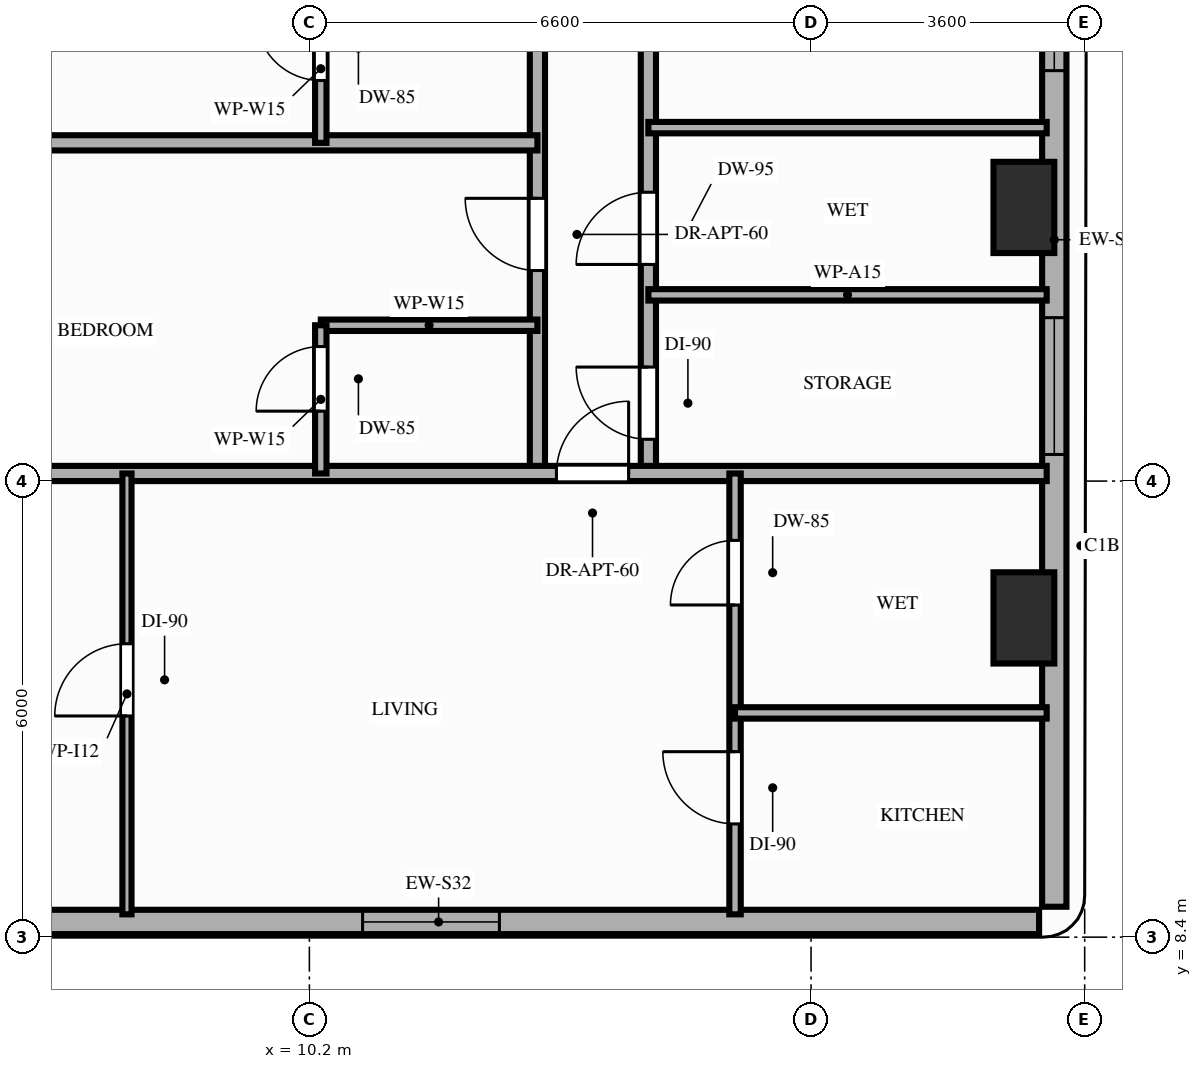
"""IFC4 building model, lengths in metres.
Left out: names, types, materials, properties, quantities, classifications, styles, units other than length and angle.
Written with IfcOpenShell. Run it as: python <this file> out.ifc"""

import sys

from ifc_helpers import new_model, si_unit, direction, frame, frame_2d, origin, origin_2d, place, context, subcontext, project, spatial, rectangle, extrude, element, fill, save


model = new_model("IFC4")
c1 = context("Model", 3, precision=1e-05, world=origin(), true_north=direction((0.0, 1.0)))
c2 = subcontext(c1, "Body", "Model", "MODEL_VIEW")
j1 = project(units=[si_unit("LENGTHUNIT", "METRE"), si_unit("PLANEANGLEUNIT", "RADIAN")], contexts=[c1])
p1 = place(None, origin())
s1 = spatial("IfcSite", under=j1, at=p1, CompositionType="ELEMENT")
p2 = place(p1, origin())
s2 = spatial("IfcBuilding", under=s1, at=p2, CompositionType="ELEMENT")
p3 = place(p2, frame((0.0, 0.0, 83.4)))
s3 = spatial("IfcBuildingStorey", under=s2, at=p3, CompositionType="ELEMENT", Elevation=83.4)
for number, where, z_axis, x_axis in (
    (1, (19.6, 12.6, 0.0), (0.0, 0.0, 1.0), (1.0, 0.0, 0.0)),
    (2, (19.6, 18.0, 0.0), (0.0, 0.0, 1.0), (1.0, 0.0, 0.0)),
):
    element("IfcColumn", number, at=place(p3, frame(where, z_axis=z_axis, x_axis=x_axis)), inside=s3, PredefinedType="COLUMN", context=c2, shape_type="SweptSolid", body=[
        extrude(rectangle(XDim=0.8, YDim=1.2, at=origin_2d()), origin(), (0.0, 0.0, 1.0), 3.2),
    ])
p4 = place(p3, frame((4.0, 8.6, 0.0), z_axis=(0.0, 0.0, 1.0), x_axis=(1.0, 0.0, 0.0)))
e3 = element("IfcWall", 3, at=p4, inside=s3, PredefinedType="STANDARD", context=c2, shape_type="SweptSolid", body=[
    extrude(rectangle(XDim=15.8, YDim=0.32, at=frame_2d((7.9, 0.0))), origin(), (0.0, 0.0, 1.0), 3.02),
])
p5 = place(p4, frame((6.9, 0.0, 0.85)))
e4 = element("IfcOpeningElement", 4, at=p5, cuts=e3, PredefinedType="OPENING", context=c2, shape_type="SweptSolid", body=[
    extrude(rectangle(XDim=1.8, YDim=1.75, at=frame_2d((0.9, 0.875))), frame((0.0, 0.17, 0.0), z_axis=(0.0, -1.0, 0.0), x_axis=(1.0, 0.0, 0.0)), (0.0, 0.0, 1.0), 0.34),
])
p6 = place(p3, frame((20.0, 8.8, 0.0), z_axis=(0.0, 0.0, 1.0), x_axis=(0.0, 1.0, 0.0)))
e5 = element("IfcWall", 5, at=p6, inside=s3, PredefinedType="STANDARD", context=c2, shape_type="SweptSolid", body=[
    extrude(rectangle(XDim=17.55, YDim=0.32, at=frame_2d((8.775, 0.0))), origin(), (0.0, 0.0, 1.0), 2.41),
])
p7 = place(p6, frame((5.95, 0.0, 0.85)))
e6 = element("IfcOpeningElement", 6, at=p7, cuts=e5, PredefinedType="OPENING", context=c2, shape_type="SweptSolid", body=[
    extrude(rectangle(XDim=1.8, YDim=1.31, at=frame_2d((0.9, 0.655))), frame((0.0, 0.17, 0.0), z_axis=(0.0, -1.0, 0.0), x_axis=(1.0, 0.0, 0.0)), (0.0, 0.0, 1.0), 0.34),
])
p8 = place(p6, frame((11.0, 0.0, 0.85)))
e7 = element("IfcOpeningElement", 7, at=p8, cuts=e5, PredefinedType="OPENING", context=c2, shape_type="SweptSolid", body=[
    extrude(rectangle(XDim=1.8, YDim=1.31, at=frame_2d((0.9, 0.655))), frame((0.0, 0.17, 0.0), z_axis=(0.0, -1.0, 0.0), x_axis=(1.0, 0.0, 0.0)), (0.0, 0.0, 1.0), 0.34),
])
p9 = place(p3, frame((13.2, 14.5, 0.0), z_axis=(0.0, 0.0, 1.0), x_axis=(0.0, 1.0, 0.0)))
e8 = element("IfcWall", 8, at=p9, inside=s3, PredefinedType="PARTITIONING", context=c2, shape_type="SweptSolid", body=[
    extrude(rectangle(XDim=13.6, YDim=0.2, at=frame_2d((6.8, 0.0))), origin(), (0.0, 0.0, 1.0), 2.41),
])
p10 = place(p9, frame((2.67, 0.0, 0.0)))
e9 = element("IfcOpeningElement", 9, at=p10, cuts=e8, PredefinedType="OPENING", context=c2, shape_type="SweptSolid", body=[
    extrude(rectangle(XDim=0.95, YDim=2.15, at=frame_2d((0.475, 1.075))), frame((0.0, 0.11, 0.0), z_axis=(0.0, -1.0, 0.0), x_axis=(1.0, 0.0, 0.0)), (0.0, 0.0, 1.0), 0.22),
])
p11 = place(p9, frame((8.46, 0.0, 0.0)))
e10 = element("IfcOpeningElement", 10, at=p11, cuts=e8, PredefinedType="OPENING", context=c2, shape_type="SweptSolid", body=[
    extrude(rectangle(XDim=0.95, YDim=2.15, at=frame_2d((0.475, 1.075))), frame((0.0, 0.11, 0.0), z_axis=(0.0, -1.0, 0.0), x_axis=(1.0, 0.0, 0.0)), (0.0, 0.0, 1.0), 0.22),
])
p12 = place(p9, frame((6.64, 0.0, 0.0)))
e11 = element("IfcOpeningElement", 11, at=p12, cuts=e8, PredefinedType="OPENING", context=c2, shape_type="SweptSolid", body=[
    extrude(rectangle(XDim=0.95, YDim=2.15, at=frame_2d((0.475, 1.075))), frame((0.0, 0.11, 0.0), z_axis=(0.0, -1.0, 0.0), x_axis=(1.0, 0.0, 0.0)), (0.0, 0.0, 1.0), 0.22),
])
p13 = place(p9, frame((12.26, 0.0, 0.0)))
e12 = element("IfcOpeningElement", 12, at=p13, cuts=e8, PredefinedType="OPENING", context=c2, shape_type="SweptSolid", body=[
    extrude(rectangle(XDim=0.95, YDim=2.15, at=frame_2d((0.475, 1.075))), frame((0.0, 0.11, 0.0), z_axis=(0.0, -1.0, 0.0), x_axis=(1.0, 0.0, 0.0)), (0.0, 0.0, 1.0), 0.22),
])
p14 = place(p3, frame((14.66, 14.5, 0.0), z_axis=(0.0, 0.0, 1.0), x_axis=(0.0, 1.0, 0.0)))
e13 = element("IfcWall", 13, at=p14, inside=s3, PredefinedType="PARTITIONING", context=c2, shape_type="SweptSolid", body=[
    extrude(rectangle(XDim=13.6, YDim=0.2, at=frame_2d((6.8, 0.0))), origin(), (0.0, 0.0, 1.0), 2.41),
])
p15 = place(p14, frame((0.45, 0.0, 0.0)))
e14 = element("IfcOpeningElement", 14, at=p15, cuts=e13, PredefinedType="OPENING", context=c2, shape_type="SweptSolid", body=[
    extrude(rectangle(XDim=0.95, YDim=2.15, at=frame_2d((0.475, 1.075))), frame((0.0, 0.11, 0.0), z_axis=(0.0, -1.0, 0.0), x_axis=(1.0, 0.0, 0.0)), (0.0, 0.0, 1.0), 0.22),
])
p16 = place(p14, frame((2.75, 0.0, 0.0)))
e15 = element("IfcOpeningElement", 15, at=p16, cuts=e13, PredefinedType="OPENING", context=c2, shape_type="SweptSolid", body=[
    extrude(rectangle(XDim=0.95, YDim=2.1, at=frame_2d((0.475, 1.05))), frame((0.0, 0.11, 0.0), z_axis=(0.0, -1.0, 0.0), x_axis=(1.0, 0.0, 0.0)), (0.0, 0.0, 1.0), 0.22),
])
p17 = place(p14, frame((8.58, 0.0, 0.0)))
e16 = element("IfcOpeningElement", 16, at=p17, cuts=e13, PredefinedType="OPENING", context=c2, shape_type="SweptSolid", body=[
    extrude(rectangle(XDim=1.0, YDim=2.15, at=frame_2d((0.5, 1.075))), frame((0.0, 0.11, 0.0), z_axis=(0.0, -1.0, 0.0), x_axis=(1.0, 0.0, 0.0)), (0.0, 0.0, 1.0), 0.22),
])
p18 = place(p3, frame((3.9, 14.5, 0.0), z_axis=(0.0, 0.0, 1.0), x_axis=(1.0, 0.0, 0.0)))
e17 = element("IfcWall", 17, at=p18, inside=s3, PredefinedType="PARTITIONING", context=c2, shape_type="SweptSolid", body=[
    extrude(rectangle(XDim=16.0, YDim=0.2, at=frame_2d((8.0, 0.0))), origin(), (0.0, 0.0, 1.0), 2.41),
])
p19 = place(p18, frame((9.55, 0.0, 0.0)))
e18 = element("IfcOpeningElement", 18, at=p19, cuts=e17, PredefinedType="OPENING", context=c2, shape_type="SweptSolid", body=[
    extrude(rectangle(XDim=0.95, YDim=2.15, at=frame_2d((0.475, 1.075))), frame((0.0, 0.11, 0.0), z_axis=(0.0, -1.0, 0.0), x_axis=(1.0, 0.0, 0.0)), (0.0, 0.0, 1.0), 0.22),
])
p20 = place(p3, frame((10.35, 16.45, 0.0), z_axis=(0.0, 0.0, 1.0), x_axis=(1.0, 0.0, 0.0)))
e19 = element("IfcWall", 19, at=p20, inside=s3, PredefinedType="PARTITIONING", context=c2, shape_type="SweptSolid", body=[
    extrude(rectangle(XDim=2.85, YDim=0.15, at=frame_2d((1.425, 0.0))), origin(), (0.0, 0.0, 1.0), 2.6),
])
p21 = place(p3, frame((10.35, 14.5, 0.0), z_axis=(0.0, 0.0, 1.0), x_axis=(0.0, 1.0, 0.0)))
e20 = element("IfcWall", 20, at=p21, inside=s3, PredefinedType="PARTITIONING", context=c2, shape_type="SweptSolid", body=[
    extrude(rectangle(XDim=1.95, YDim=0.15, at=frame_2d((0.975, 0.0))), origin(), (0.0, 0.0, 1.0), 2.6),
])
p22 = place(p21, frame((0.82, 0.0, 0.0)))
e21 = element("IfcOpeningElement", 21, at=p22, cuts=e20, PredefinedType="OPENING", context=c2, shape_type="SweptSolid", body=[
    extrude(rectangle(XDim=0.85, YDim=2.1, at=frame_2d((0.425, 1.05))), frame((0.0, 0.085, 0.0), z_axis=(0.0, -1.0, 0.0), x_axis=(1.0, 0.0, 0.0)), (0.0, 0.0, 1.0), 0.17),
])
p23 = place(p3, frame((3.9, 18.85, 0.0), z_axis=(0.0, 0.0, 1.0), x_axis=(1.0, 0.0, 0.0)))
e22 = element("IfcWall", 22, at=p23, inside=s3, PredefinedType="PARTITIONING", context=c2, shape_type="SweptSolid", body=[
    extrude(rectangle(XDim=9.3, YDim=0.2, at=frame_2d((4.65, 0.0))), origin(), (0.0, 0.0, 1.0), 2.41),
])
p24 = place(p3, frame((10.35, 18.85, 0.0), z_axis=(0.0, 0.0, 1.0), x_axis=(0.0, 1.0, 0.0)))
e23 = element("IfcWall", 23, at=p24, inside=s3, PredefinedType="PARTITIONING", context=c2, shape_type="SweptSolid", body=[
    extrude(rectangle(XDim=1.95, YDim=0.15, at=frame_2d((0.975, 0.0))), origin(), (0.0, 0.0, 1.0), 2.71),
])
p25 = place(p24, frame((0.82, 0.0, 0.0)))
e24 = element("IfcOpeningElement", 24, at=p25, cuts=e23, PredefinedType="OPENING", context=c2, shape_type="SweptSolid", body=[
    extrude(rectangle(XDim=0.85, YDim=2.1, at=frame_2d((0.425, 1.05))), frame((0.0, 0.085, 0.0), z_axis=(0.0, -1.0, 0.0), x_axis=(1.0, 0.0, 0.0)), (0.0, 0.0, 1.0), 0.17),
])
p26 = place(p3, frame((7.8, 8.7, 0.0), z_axis=(0.0, 0.0, 1.0), x_axis=(0.0, 1.0, 0.0)))
e25 = element("IfcWall", 25, at=p26, inside=s3, PredefinedType="PARTITIONING", context=c2, shape_type="SweptSolid", body=[
    extrude(rectangle(XDim=5.8, YDim=0.12, at=frame_2d((2.9, 0.0))), origin(), (0.0, 0.0, 1.0), 2.41),
])
p27 = place(p26, frame((2.61, 0.0, 0.0)))
e26 = element("IfcOpeningElement", 26, at=p27, cuts=e25, PredefinedType="OPENING", context=c2, shape_type="SweptSolid", body=[
    extrude(rectangle(XDim=0.95, YDim=2.15, at=frame_2d((0.475, 1.075))), frame((0.0, 0.07, 0.0), z_axis=(0.0, -1.0, 0.0), x_axis=(1.0, 0.0, 0.0)), (0.0, 0.0, 1.0), 0.14),
])
p28 = place(p3, frame((15.8, 8.7, 0.0), z_axis=(0.0, 0.0, 1.0), x_axis=(0.0, 1.0, 0.0)))
e27 = element("IfcWall", 27, at=p28, inside=s3, PredefinedType="PARTITIONING", context=c2, shape_type="SweptSolid", body=[
    extrude(rectangle(XDim=5.8, YDim=0.15, at=frame_2d((2.9, 0.0))), origin(), (0.0, 0.0, 1.0), 2.41),
])
p29 = place(p28, frame((1.19, 0.0, 0.0)))
e28 = element("IfcOpeningElement", 28, at=p29, cuts=e27, PredefinedType="OPENING", context=c2, shape_type="SweptSolid", body=[
    extrude(rectangle(XDim=0.95, YDim=2.15, at=frame_2d((0.475, 1.075))), frame((0.0, 0.085, 0.0), z_axis=(0.0, -1.0, 0.0), x_axis=(1.0, 0.0, 0.0)), (0.0, 0.0, 1.0), 0.17),
])
p30 = place(p28, frame((4.07, 0.0, 0.0)))
e29 = element("IfcOpeningElement", 29, at=p30, cuts=e27, PredefinedType="OPENING", context=c2, shape_type="SweptSolid", body=[
    extrude(rectangle(XDim=0.85, YDim=2.1, at=frame_2d((0.425, 1.05))), frame((0.0, 0.085, 0.0), z_axis=(0.0, -1.0, 0.0), x_axis=(1.0, 0.0, 0.0)), (0.0, 0.0, 1.0), 0.17),
])
p31 = place(p3, frame((15.8, 11.35, 0.0), z_axis=(0.0, 0.0, 1.0), x_axis=(1.0, 0.0, 0.0)))
e30 = element("IfcWall", 30, at=p31, inside=s3, PredefinedType="PARTITIONING", context=c2, shape_type="SweptSolid", body=[
    extrude(rectangle(XDim=4.1, YDim=0.15, at=frame_2d((2.05, 0.0))), origin(), (0.0, 0.0, 1.0), 3.02),
])
for number, where, z_axis, x_axis in (
    (31, (14.66, 16.85, 0.0), (0.0, 0.0, 1.0), (1.0, 0.0, 0.0)),
    (32, (14.66, 19.05, 0.0), (0.0, 0.0, 1.0), (1.0, 0.0, 0.0)),
):
    element("IfcWall", number, at=place(p3, frame(where, z_axis=z_axis, x_axis=x_axis)), inside=s3, PredefinedType="PARTITIONING", context=c2, shape_type="SweptSolid", body=[
        extrude(rectangle(XDim=5.24, YDim=0.15, at=frame_2d((2.62, 0.0))), origin(), (0.0, 0.0, 1.0), 2.41),
    ])
p32 = place(p5, origin())
e33 = element("IfcWindow", 33, at=p32, inside=s3, PartitioningType="SINGLE_PANEL", PredefinedType="WINDOW", context=c2, shape_type="SweptSolid", body=[
    extrude(rectangle(XDim=1.8, YDim=1.75, at=frame_2d((0.9, 0.875))), frame((0.0, 0.03, 0.0), z_axis=(0.0, -1.0, 0.0), x_axis=(1.0, 0.0, 0.0)), (0.0, 0.0, 1.0), 0.06),
])
fill(e4, e33)
p33 = place(p7, origin())
e34 = element("IfcWindow", 34, at=p33, inside=s3, PartitioningType="SINGLE_PANEL", PredefinedType="WINDOW", context=c2, shape_type="SweptSolid", body=[
    extrude(rectangle(XDim=1.8, YDim=1.31, at=frame_2d((0.9, 0.655))), frame((0.0, 0.03, 0.0), z_axis=(0.0, -1.0, 0.0), x_axis=(1.0, 0.0, 0.0)), (0.0, 0.0, 1.0), 0.06),
])
fill(e6, e34)
p34 = place(p8, origin())
e35 = element("IfcWindow", 35, at=p34, inside=s3, PartitioningType="SINGLE_PANEL", PredefinedType="WINDOW", context=c2, shape_type="SweptSolid", body=[
    extrude(rectangle(XDim=1.8, YDim=1.31, at=frame_2d((0.9, 0.655))), frame((0.0, 0.03, 0.0), z_axis=(0.0, -1.0, 0.0), x_axis=(1.0, 0.0, 0.0)), (0.0, 0.0, 1.0), 0.06),
])
fill(e7, e35)
p35 = place(p22, origin())
e36 = element("IfcDoor", 36, at=p35, inside=s3, OperationType="SINGLE_SWING_LEFT", PredefinedType="DOOR", context=c2, shape_type="SweptSolid", body=[
    extrude(rectangle(XDim=0.85, YDim=2.1, at=frame_2d((0.425, 1.05))), frame((0.0, 0.025, 0.0), z_axis=(0.0, -1.0, 0.0), x_axis=(1.0, 0.0, 0.0)), (0.0, 0.0, 1.0), 0.05),
])
fill(e21, e36)
p36 = place(p10, origin())
e37 = element("IfcDoor", 37, at=p36, inside=s3, OperationType="SINGLE_SWING_RIGHT", PredefinedType="DOOR", context=c2, shape_type="SweptSolid", body=[
    extrude(rectangle(XDim=0.95, YDim=2.15, at=frame_2d((0.475, 1.075))), frame((0.0, 0.025, 0.0), z_axis=(0.0, -1.0, 0.0), x_axis=(1.0, 0.0, 0.0)), (0.0, 0.0, 1.0), 0.05),
])
fill(e9, e37)
p37 = place(p25, origin())
e38 = element("IfcDoor", 38, at=p37, inside=s3, OperationType="SINGLE_SWING_RIGHT", PredefinedType="DOOR", context=c2, shape_type="SweptSolid", body=[
    extrude(rectangle(XDim=0.85, YDim=2.1, at=frame_2d((0.425, 1.05))), frame((0.0, 0.025, 0.0), z_axis=(0.0, -1.0, 0.0), x_axis=(1.0, 0.0, 0.0)), (0.0, 0.0, 1.0), 0.05),
])
fill(e24, e38)
p38 = place(p19, origin())
e39 = element("IfcDoor", 39, at=p38, inside=s3, OperationType="SINGLE_SWING_RIGHT", PredefinedType="DOOR", context=c2, shape_type="SweptSolid", body=[
    extrude(rectangle(XDim=0.95, YDim=2.15, at=frame_2d((0.475, 1.075))), frame((0.0, 0.025, 0.0), z_axis=(0.0, -1.0, 0.0), x_axis=(1.0, 0.0, 0.0)), (0.0, 0.0, 1.0), 0.05),
])
fill(e18, e39)
p39 = place(p27, origin())
e40 = element("IfcDoor", 40, at=p39, inside=s3, OperationType="SINGLE_SWING_LEFT", PredefinedType="DOOR", context=c2, shape_type="SweptSolid", body=[
    extrude(rectangle(XDim=0.95, YDim=2.15, at=frame_2d((0.475, 1.075))), frame((0.0, 0.025, 0.0), z_axis=(0.0, -1.0, 0.0), x_axis=(1.0, 0.0, 0.0)), (0.0, 0.0, 1.0), 0.05),
])
fill(e26, e40)
p40 = place(p29, origin())
e41 = element("IfcDoor", 41, at=p40, inside=s3, OperationType="SINGLE_SWING_RIGHT", PredefinedType="DOOR", context=c2, shape_type="SweptSolid", body=[
    extrude(rectangle(XDim=0.95, YDim=2.15, at=frame_2d((0.475, 1.075))), frame((0.0, 0.025, 0.0), z_axis=(0.0, -1.0, 0.0), x_axis=(1.0, 0.0, 0.0)), (0.0, 0.0, 1.0), 0.05),
])
fill(e28, e41)
p41 = place(p30, origin())
e42 = element("IfcDoor", 42, at=p41, inside=s3, OperationType="SINGLE_SWING_LEFT", PredefinedType="DOOR", context=c2, shape_type="SweptSolid", body=[
    extrude(rectangle(XDim=0.85, YDim=2.1, at=frame_2d((0.425, 1.05))), frame((0.0, 0.025, 0.0), z_axis=(0.0, -1.0, 0.0), x_axis=(1.0, 0.0, 0.0)), (0.0, 0.0, 1.0), 0.05),
])
fill(e29, e42)
p42 = place(p15, origin())
e43 = element("IfcDoor", 43, at=p42, inside=s3, OperationType="SINGLE_SWING_RIGHT", PredefinedType="DOOR", context=c2, shape_type="SweptSolid", body=[
    extrude(rectangle(XDim=0.95, YDim=2.15, at=frame_2d((0.475, 1.075))), frame((0.0, 0.025, 0.0), z_axis=(0.0, -1.0, 0.0), x_axis=(1.0, 0.0, 0.0)), (0.0, 0.0, 1.0), 0.05),
])
fill(e14, e43)
p43 = place(p16, origin())
e44 = element("IfcDoor", 44, at=p43, inside=s3, OperationType="SINGLE_SWING_LEFT", PredefinedType="DOOR", context=c2, shape_type="SweptSolid", body=[
    extrude(rectangle(XDim=0.95, YDim=2.1, at=frame_2d((0.475, 1.05))), frame((0.0, 0.025, 0.0), z_axis=(0.0, -1.0, 0.0), x_axis=(1.0, 0.0, 0.0)), (0.0, 0.0, 1.0), 0.05),
])
fill(e15, e44)
save(model, sys.argv[1])
